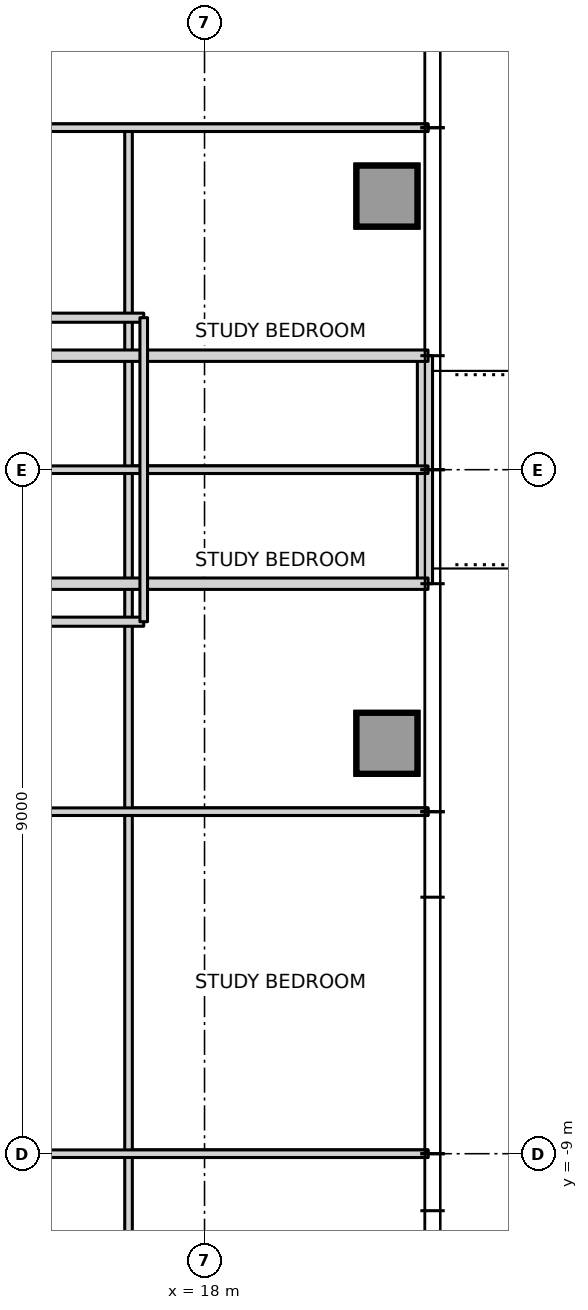
"""IFC4 building model, lengths in metres.
Left out: names, types, materials, properties, quantities, classifications, styles, units other than length and angle.
Written with IfcOpenShell. Run it as: python <this file> out.ifc"""

import sys

from ifc_helpers import new_model, si_unit, direction, frame, frame_2d, origin, origin_2d, place, context, subcontext, project, spatial, rectangle, hollow_rectangle, extrude, element, fill, save


model = new_model("IFC4")
c1 = context("Model", 3, precision=1e-05, world=origin(), true_north=direction((0.0, 1.0)))
c2 = subcontext(c1, "Body", "Model", "MODEL_VIEW")
j1 = project(units=[si_unit("LENGTHUNIT", "METRE"), si_unit("PLANEANGLEUNIT", "RADIAN")], contexts=[c1])
p1 = place(None, origin())
s1 = spatial("IfcSite", under=j1, at=p1, CompositionType="ELEMENT")
p2 = place(p1, origin())
s2 = spatial("IfcBuilding", under=s1, at=p2, CompositionType="ELEMENT")
p3 = place(p2, frame((0.0, 0.0, 126.0)))
s3 = spatial("IfcBuildingStorey", under=s2, at=p3, CompositionType="ELEMENT", Elevation=126.0)
for number, where, z_axis, x_axis in (
    (1, (20.4, -3.6, 0.0), (0.0, 0.0, 1.0), (1.0, 0.0, 0.0)),
    (2, (20.4, 3.6, 0.0), (0.0, 0.0, 1.0), (1.0, 0.0, 0.0)),
):
    element("IfcColumn", number, at=place(p3, frame(where, z_axis=z_axis, x_axis=x_axis)), inside=s3, PredefinedType="COLUMN", context=c2, shape_type="SweptSolid", body=[
        extrude(hollow_rectangle(XDim=0.8, YDim=0.8, WallThickness=0.07, at=origin_2d()), origin(), (0.0, 0.0, 1.0), 3.5),
    ])
for number, where, z_axis, x_axis in (
    (3, (17.0, -9.0, 0.0), (0.0, 0.0, 1.0), (1.0, 0.0, 0.0)),
    (4, (17.0, -4.5, 0.0), (0.0, 0.0, 1.0), (1.0, 0.0, 0.0)),
):
    element("IfcWall", number, at=place(p3, frame(where, z_axis=z_axis, x_axis=x_axis)), inside=s3, PredefinedType="PARTITIONING", context=c2, shape_type="SweptSolid", body=[
        extrude(rectangle(XDim=3.94, YDim=0.1, at=frame_2d((1.97, 0.0))), origin(), (0.0, 0.0, 1.0), 3.27),
    ])
p4 = place(p3, frame((17.0, 0.0, 0.0), z_axis=(0.0, 0.0, 1.0), x_axis=(1.0, 0.0, 0.0)))
e5 = element("IfcWall", 5, at=p4, inside=s3, PredefinedType="PARTITIONING", context=c2, shape_type="SweptSolid", body=[
    extrude(rectangle(XDim=3.94, YDim=0.1, at=frame_2d((1.97, 0.0))), origin(), (0.0, 0.0, 1.0), 2.587),
])
p5 = place(p3, frame((11.6, 4.5, 0.0), z_axis=(0.0, 0.0, 1.0), x_axis=(1.0, 0.0, 0.0)))
e6 = element("IfcWall", 6, at=p5, inside=s3, PredefinedType="PARTITIONING", context=c2, shape_type="SweptSolid", body=[
    extrude(rectangle(XDim=9.34, YDim=0.1, at=frame_2d((4.67, 0.0))), origin(), (0.0, 0.0, 1.0), 3.27),
])
p6 = place(p3, frame((17.0, -13.5, 0.0), z_axis=(0.0, 0.0, 1.0), x_axis=(0.0, 1.0, 0.0)))
e7 = element("IfcWall", 7, at=p6, inside=s3, PredefinedType="PARTITIONING", context=c2, shape_type="SweptSolid", body=[
    extrude(rectangle(XDim=18.0, YDim=0.1, at=frame_2d((9.0, 0.0))), origin(), (0.0, 0.0, 1.0), 3.27),
])
p7 = place(p6, frame((1.8, 0.0, 0.0)))
e8 = element("IfcOpeningElement", 8, at=p7, cuts=e7, PredefinedType="OPENING", context=c2, shape_type="SweptSolid", body=[
    extrude(rectangle(XDim=0.9, YDim=2.1, at=frame_2d((0.45, 1.05))), frame((0.0, 0.06, 0.0), z_axis=(0.0, -1.0, 0.0), x_axis=(1.0, 0.0, 0.0)), (0.0, 0.0, 1.0), 0.12),
])
p8 = place(p6, frame((6.3, 0.0, 0.0)))
e9 = element("IfcOpeningElement", 9, at=p8, cuts=e7, PredefinedType="OPENING", context=c2, shape_type="SweptSolid", body=[
    extrude(rectangle(XDim=0.9, YDim=2.1, at=frame_2d((0.45, 1.05))), frame((0.0, 0.06, 0.0), z_axis=(0.0, -1.0, 0.0), x_axis=(1.0, 0.0, 0.0)), (0.0, 0.0, 1.0), 0.12),
])
p9 = place(p6, frame((10.8, 0.0, 0.0)))
e10 = element("IfcOpeningElement", 10, at=p9, cuts=e7, PredefinedType="OPENING", context=c2, shape_type="SweptSolid", body=[
    extrude(rectangle(XDim=0.9, YDim=2.1, at=frame_2d((0.45, 1.05))), frame((0.0, 0.06, 0.0), z_axis=(0.0, -1.0, 0.0), x_axis=(1.0, 0.0, 0.0)), (0.0, 0.0, 1.0), 0.12),
])
p10 = place(p6, frame((15.3, 0.0, 0.0)))
e11 = element("IfcOpeningElement", 11, at=p10, cuts=e7, PredefinedType="OPENING", context=c2, shape_type="SweptSolid", body=[
    extrude(rectangle(XDim=0.9, YDim=2.1, at=frame_2d((0.45, 1.05))), frame((0.0, 0.06, 0.0), z_axis=(0.0, -1.0, 0.0), x_axis=(1.0, 0.0, 0.0)), (0.0, 0.0, 1.0), 0.12),
])
p11 = place(p8, origin())
e12 = element("IfcDoor", 12, at=p11, inside=s3, OperationType="SINGLE_SWING_LEFT", PredefinedType="DOOR", context=c2, shape_type="SweptSolid", body=[
    extrude(rectangle(XDim=0.9, YDim=2.1, at=frame_2d((0.45, 1.05))), frame((0.0, 0.025, 0.0), z_axis=(0.0, -1.0, 0.0), x_axis=(1.0, 0.0, 0.0)), (0.0, 0.0, 1.0), 0.05),
])
fill(e9, e12)
p12 = place(p9, origin())
e13 = element("IfcDoor", 13, at=p12, inside=s3, OperationType="SINGLE_SWING_RIGHT", PredefinedType="DOOR", context=c2, shape_type="SweptSolid", body=[
    extrude(rectangle(XDim=0.9, YDim=2.1, at=frame_2d((0.45, 1.05))), frame((0.0, 0.025, 0.0), z_axis=(0.0, -1.0, 0.0), x_axis=(1.0, 0.0, 0.0)), (0.0, 0.0, 1.0), 0.05),
])
fill(e10, e13)
p13 = place(p10, origin())
e14 = element("IfcDoor", 14, at=p13, inside=s3, OperationType="SINGLE_SWING_RIGHT", PredefinedType="DOOR", context=c2, shape_type="SweptSolid", body=[
    extrude(rectangle(XDim=0.9, YDim=2.1, at=frame_2d((0.45, 1.05))), frame((0.0, 0.025, 0.0), z_axis=(0.0, -1.0, 0.0), x_axis=(1.0, 0.0, 0.0)), (0.0, 0.0, 1.0), 0.05),
])
fill(e11, e14)
save(model, sys.argv[1])
